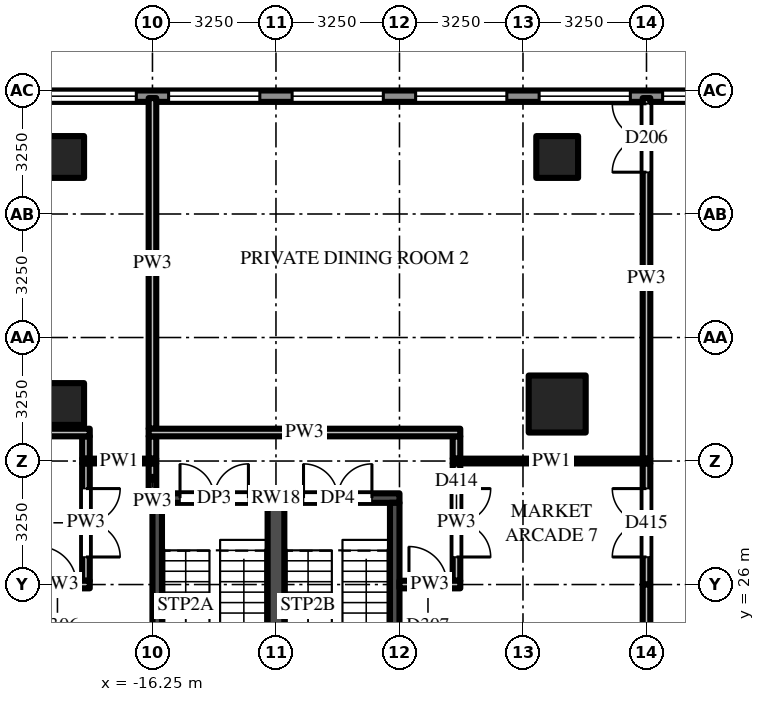
"""IFC4 building model, lengths in metres.
Left out: names, types, materials, properties, quantities, classifications, styles, units other than length and angle.
Written with IfcOpenShell. Run it as: python <this file> out.ifc"""

import sys

from ifc_helpers import new_model, si_unit, direction, frame, frame_2d, origin, origin_2d, place, context, subcontext, project, spatial, rectangle, extrude, source, transform, mapped, element, fill, save


model = new_model("IFC4")
c1 = context("Model", 3, precision=1e-05, world=origin(), true_north=direction((0.0, 1.0)))
c2 = subcontext(c1, "Body", "Model", "MODEL_VIEW")
j1 = project(units=[si_unit("LENGTHUNIT", "METRE"), si_unit("PLANEANGLEUNIT", "RADIAN")], contexts=[c1])
p1 = place(None, origin())
s1 = spatial("IfcSite", under=j1, at=p1, CompositionType="ELEMENT")
p2 = place(p1, origin())
s2 = spatial("IfcBuilding", under=s1, at=p2, CompositionType="ELEMENT")
p3 = place(p2, frame((0.0, 0.0, 19.0)))
s3 = spatial("IfcBuildingStorey", under=s2, at=p3, CompositionType="ELEMENT", Elevation=19.0)
m1 = source(origin(), c2, "Body", "SweptSolid", [
    extrude(rectangle(XDim=1.5, YDim=1.5, at=origin_2d()), origin(), (0.0, 0.0, 1.0), 5.0),
])
p4 = place(p3, frame((-5.6, 30.75, 0.0), z_axis=(0.0, 0.0, 1.0), x_axis=(1.0, 0.0, 0.0)))
e1 = element("IfcColumn", 1, at=p4, inside=s3, PredefinedType="COLUMN", context=c2, shape_type="MappedRepresentation", body=[
    mapped(m1, transform((0.0, 0.0, 0.0))),
])
m2 = source(origin(), c2, "Body", "SweptSolid", [
    extrude(rectangle(XDim=1.1, YDim=1.1, at=origin_2d()), origin(), (0.0, 0.0, 1.0), 5.0),
])
for number, where, z_axis, x_axis in (
    (2, (-5.6, 37.25, 0.0), (0.0, 0.0, 1.0), (1.0, 0.0, 0.0)),
    (3, (-18.6, 30.75, 0.0), (0.0, 0.0, 1.0), (1.0, 0.0, 0.0)),
    (4, (-18.6, 37.25, 0.0), (0.0, 0.0, 1.0), (1.0, 0.0, 0.0)),
):
    element("IfcColumn", number, at=place(p3, frame(where, z_axis=z_axis, x_axis=x_axis)), inside=s3, PredefinedType="COLUMN", context=c2, shape_type="MappedRepresentation", body=[
        mapped(m2, transform((0.0, 0.0, 0.0))),
    ])
m3 = source(origin(), c2, "Body", "SweptSolid", [
    extrude(rectangle(XDim=6.5, YDim=0.25, at=frame_2d((3.25, 0.0))), origin(), (0.0, 0.0, 1.0), 4.7),
])
p5 = place(p3, frame((-16.25, 28.275, 0.0), z_axis=(0.0, 0.0, 1.0), x_axis=(1.0, 0.0, 0.0)))
e5 = element("IfcWall", 5, at=p5, inside=s3, PredefinedType="SHEAR", context=c2, shape_type="MappedRepresentation", body=[
    mapped(m3, transform((0.0, 0.0, 0.0))),
])
m4 = source(origin(), c2, "Body", "SweptSolid", [
    extrude(rectangle(XDim=1.8, YDim=2.1, at=frame_2d((0.9, 1.05))), frame((0.0, 0.135, 0.0), z_axis=(0.0, -1.0, 0.0), x_axis=(1.0, 0.0, 0.0)), (0.0, 0.0, 1.0), 0.27),
])
p6 = place(p5, frame((0.725, 0.0, 0.0)))
e6 = element("IfcOpeningElement", 6, at=p6, cuts=e5, PredefinedType="OPENING", context=c2, shape_type="MappedRepresentation", body=[
    mapped(m4, transform((0.0, 0.0, 0.0))),
])
p7 = place(p5, frame((3.975, 0.0, 0.0)))
e7 = element("IfcOpeningElement", 7, at=p7, cuts=e5, PredefinedType="OPENING", context=c2, shape_type="MappedRepresentation", body=[
    mapped(m4, transform((0.0, 0.0, 0.0))),
])
m5 = source(origin(), c2, "Body", "SweptSolid", [
    extrude(rectangle(XDim=8.3, YDim=0.25, at=frame_2d((4.15, 0.0))), origin(), (0.0, 0.0, 1.0), 4.7),
])
for number, where, z_axis, x_axis in (
    (8, (-16.125, 19.85, 0.0), (0.0, 0.0, 1.0), (0.0, 1.0, 0.0)),
    (9, (-9.875, 19.85, 0.0), (0.0, 0.0, 1.0), (0.0, 1.0, 0.0)),
):
    element("IfcWall", number, at=place(p3, frame(where, z_axis=z_axis, x_axis=x_axis)), inside=s3, PredefinedType="SHEAR", context=c2, shape_type="MappedRepresentation", body=[
        mapped(m5, transform((0.0, 0.0, 0.0))),
    ])
m6 = source(origin(), c2, "Body", "SweptSolid", [
    extrude(rectangle(XDim=8.3, YDim=0.44, at=frame_2d((4.15, 0.0))), origin(), (0.0, 0.0, 1.0), 4.7),
])
p8 = place(p3, frame((-13.0, 19.85, 0.0), z_axis=(0.0, 0.0, 1.0), x_axis=(0.0, 1.0, 0.0)))
e10 = element("IfcWall", 10, at=p8, inside=s3, PredefinedType="SHEAR", context=c2, shape_type="MappedRepresentation", body=[
    mapped(m6, transform((0.0, 0.0, 0.0))),
])
m7 = source(origin(), c2, "Body", "SweptSolid", [
    extrude(rectangle(XDim=71.5, YDim=0.3, at=frame_2d((35.75, 0.0))), origin(), (0.0, 0.0, 1.0), 4.7),
])
p9 = place(p3, frame((35.75, 38.85, 0.0), z_axis=(0.0, 0.0, 1.0), x_axis=(-1.0, 0.0, 0.0)))
e11 = element("IfcWall", 11, at=p9, inside=s3, PredefinedType="SOLIDWALL", context=c2, shape_type="MappedRepresentation", body=[
    mapped(m7, transform((0.0, 0.0, 0.0))),
])
m8 = source(origin(), c2, "Body", "SweptSolid", [
    extrude(rectangle(XDim=2.4, YDim=3.0, at=frame_2d((1.2, 1.5))), frame((0.0, 0.16, 0.0), z_axis=(0.0, -1.0, 0.0), x_axis=(1.0, 0.0, 0.0)), (0.0, 0.0, 1.0), 0.32),
])
p10 = place(p9, frame((0.425, 0.0, 0.9)))
e12 = element("IfcOpeningElement", 12, at=p10, cuts=e11, PredefinedType="OPENING", context=c2, shape_type="MappedRepresentation", body=[
    mapped(m8, transform((0.0, 0.0, 0.0))),
])
p11 = place(p9, frame((3.675, 0.0, 0.9)))
e13 = element("IfcOpeningElement", 13, at=p11, cuts=e11, PredefinedType="OPENING", context=c2, shape_type="MappedRepresentation", body=[
    mapped(m8, transform((0.0, 0.0, 0.0))),
])
p12 = place(p9, frame((6.925, 0.0, 0.9)))
e14 = element("IfcOpeningElement", 14, at=p12, cuts=e11, PredefinedType="OPENING", context=c2, shape_type="MappedRepresentation", body=[
    mapped(m8, transform((0.0, 0.0, 0.0))),
])
p13 = place(p9, frame((10.175, 0.0, 0.9)))
e15 = element("IfcOpeningElement", 15, at=p13, cuts=e11, PredefinedType="OPENING", context=c2, shape_type="MappedRepresentation", body=[
    mapped(m8, transform((0.0, 0.0, 0.0))),
])
p14 = place(p9, frame((13.425, 0.0, 0.9)))
e16 = element("IfcOpeningElement", 16, at=p14, cuts=e11, PredefinedType="OPENING", context=c2, shape_type="MappedRepresentation", body=[
    mapped(m8, transform((0.0, 0.0, 0.0))),
])
p15 = place(p9, frame((16.675, 0.0, 0.9)))
e17 = element("IfcOpeningElement", 17, at=p15, cuts=e11, PredefinedType="OPENING", context=c2, shape_type="MappedRepresentation", body=[
    mapped(m8, transform((0.0, 0.0, 0.0))),
])
p16 = place(p9, frame((19.925, 0.0, 0.9)))
e18 = element("IfcOpeningElement", 18, at=p16, cuts=e11, PredefinedType="OPENING", context=c2, shape_type="MappedRepresentation", body=[
    mapped(m8, transform((0.0, 0.0, 0.0))),
])
p17 = place(p9, frame((23.175, 0.0, 0.9)))
e19 = element("IfcOpeningElement", 19, at=p17, cuts=e11, PredefinedType="OPENING", context=c2, shape_type="MappedRepresentation", body=[
    mapped(m8, transform((0.0, 0.0, 0.0))),
])
p18 = place(p9, frame((26.425, 0.0, 0.9)))
e20 = element("IfcOpeningElement", 20, at=p18, cuts=e11, PredefinedType="OPENING", context=c2, shape_type="MappedRepresentation", body=[
    mapped(m8, transform((0.0, 0.0, 0.0))),
])
p19 = place(p9, frame((29.675, 0.0, 0.9)))
e21 = element("IfcOpeningElement", 21, at=p19, cuts=e11, PredefinedType="OPENING", context=c2, shape_type="MappedRepresentation", body=[
    mapped(m8, transform((0.0, 0.0, 0.0))),
])
p20 = place(p9, frame((32.925, 0.0, 0.9)))
e22 = element("IfcOpeningElement", 22, at=p20, cuts=e11, PredefinedType="OPENING", context=c2, shape_type="MappedRepresentation", body=[
    mapped(m8, transform((0.0, 0.0, 0.0))),
])
p21 = place(p9, frame((36.175, 0.0, 0.9)))
e23 = element("IfcOpeningElement", 23, at=p21, cuts=e11, PredefinedType="OPENING", context=c2, shape_type="MappedRepresentation", body=[
    mapped(m8, transform((0.0, 0.0, 0.0))),
])
p22 = place(p9, frame((39.425, 0.0, 0.9)))
e24 = element("IfcOpeningElement", 24, at=p22, cuts=e11, PredefinedType="OPENING", context=c2, shape_type="MappedRepresentation", body=[
    mapped(m8, transform((0.0, 0.0, 0.0))),
])
p23 = place(p9, frame((42.675, 0.0, 0.9)))
e25 = element("IfcOpeningElement", 25, at=p23, cuts=e11, PredefinedType="OPENING", context=c2, shape_type="MappedRepresentation", body=[
    mapped(m8, transform((0.0, 0.0, 0.0))),
])
p24 = place(p9, frame((45.925, 0.0, 0.9)))
e26 = element("IfcOpeningElement", 26, at=p24, cuts=e11, PredefinedType="OPENING", context=c2, shape_type="MappedRepresentation", body=[
    mapped(m8, transform((0.0, 0.0, 0.0))),
])
p25 = place(p9, frame((49.175, 0.0, 0.9)))
e27 = element("IfcOpeningElement", 27, at=p25, cuts=e11, PredefinedType="OPENING", context=c2, shape_type="MappedRepresentation", body=[
    mapped(m8, transform((0.0, 0.0, 0.0))),
])
p26 = place(p9, frame((52.425, 0.0, 0.9)))
e28 = element("IfcOpeningElement", 28, at=p26, cuts=e11, PredefinedType="OPENING", context=c2, shape_type="MappedRepresentation", body=[
    mapped(m8, transform((0.0, 0.0, 0.0))),
])
p27 = place(p9, frame((55.675, 0.0, 0.9)))
e29 = element("IfcOpeningElement", 29, at=p27, cuts=e11, PredefinedType="OPENING", context=c2, shape_type="MappedRepresentation", body=[
    mapped(m8, transform((0.0, 0.0, 0.0))),
])
p28 = place(p9, frame((58.925, 0.0, 0.9)))
e30 = element("IfcOpeningElement", 30, at=p28, cuts=e11, PredefinedType="OPENING", context=c2, shape_type="MappedRepresentation", body=[
    mapped(m8, transform((0.0, 0.0, 0.0))),
])
p29 = place(p9, frame((62.175, 0.0, 0.9)))
e31 = element("IfcOpeningElement", 31, at=p29, cuts=e11, PredefinedType="OPENING", context=c2, shape_type="MappedRepresentation", body=[
    mapped(m8, transform((0.0, 0.0, 0.0))),
])
p30 = place(p9, frame((65.425, 0.0, 0.9)))
e32 = element("IfcOpeningElement", 32, at=p30, cuts=e11, PredefinedType="OPENING", context=c2, shape_type="MappedRepresentation", body=[
    mapped(m8, transform((0.0, 0.0, 0.0))),
])
p31 = place(p9, frame((68.675, 0.0, 0.9)))
e33 = element("IfcOpeningElement", 33, at=p31, cuts=e11, PredefinedType="OPENING", context=c2, shape_type="MappedRepresentation", body=[
    mapped(m8, transform((0.0, 0.0, 0.0))),
])
m9 = source(origin(), c2, "Body", "SweptSolid", [
    extrude(rectangle(XDim=3.087, YDim=0.2, at=frame_2d((1.544, 0.0))), origin(), (0.0, 0.0, 1.0), 4.274),
])
p32 = place(p3, frame((-18.0, 29.188, 0.0), z_axis=(0.0, 0.0, 1.0), x_axis=(0.0, -1.0, 0.0)))
e34 = element("IfcWall", 34, at=p32, inside=s3, PredefinedType="PARTITIONING", context=c2, shape_type="MappedRepresentation", body=[
    mapped(m9, transform((0.0, 0.0, 0.0))),
])
m10 = source(origin(), c2, "Body", "SweptSolid", [
    extrude(rectangle(XDim=1.8, YDim=2.1, at=frame_2d((0.9, 1.05))), frame((0.0, 0.11, 0.0), z_axis=(0.0, -1.0, 0.0), x_axis=(1.0, 0.0, 0.0)), (0.0, 0.0, 1.0), 0.22),
])
p33 = place(p32, frame((0.663, 0.0, 0.0)))
e35 = element("IfcOpeningElement", 35, at=p33, cuts=e34, PredefinedType="OPENING", context=c2, shape_type="MappedRepresentation", body=[
    mapped(m10, transform((0.0, 0.0, 0.0))),
])
m11 = source(origin(), c2, "Body", "SweptSolid", [
    extrude(rectangle(XDim=0.587, YDim=0.2, at=frame_2d((0.294, 0.0))), origin(), (0.0, 0.0, 1.0), 4.7),
])
p34 = place(p3, frame((-18.0, 29.312, 0.0), z_axis=(0.0, 0.0, 1.0), x_axis=(0.0, 1.0, 0.0)))
e36 = element("IfcWall", 36, at=p34, inside=s3, PredefinedType="PARTITIONING", context=c2, shape_type="MappedRepresentation", body=[
    mapped(m11, transform((0.0, 0.0, 0.0))),
])
m12 = source(origin(), c2, "Body", "SweptSolid", [
    extrude(rectangle(XDim=0.788, YDim=0.2, at=frame_2d((0.394, 0.0))), origin(), (0.0, 0.0, 1.0), 4.7),
])
p35 = place(p3, frame((-16.25, 28.4, 0.0), z_axis=(0.0, 0.0, 1.0), x_axis=(0.0, 1.0, 0.0)))
e37 = element("IfcWall", 37, at=p35, inside=s3, PredefinedType="PARTITIONING", context=c2, shape_type="MappedRepresentation", body=[
    mapped(m12, transform((0.0, 0.0, 0.0))),
])
m13 = source(origin(), c2, "Body", "SweptSolid", [
    extrude(rectangle(XDim=8.7, YDim=0.2, at=frame_2d((4.35, 0.0))), origin(), (0.0, 0.0, 1.0), 3.762),
])
p36 = place(p3, frame((-16.25, 30.1, 0.0), z_axis=(0.0, 0.0, 1.0), x_axis=(0.0, 1.0, 0.0)))
e38 = element("IfcWall", 38, at=p36, inside=s3, PredefinedType="PARTITIONING", context=c2, shape_type="MappedRepresentation", body=[
    mapped(m13, transform((0.0, 0.0, 0.0))),
])
p37 = place(p3, frame((-16.25, 29.312, 0.0), z_axis=(0.0, 0.0, 1.0), x_axis=(0.0, 1.0, 0.0)))
e39 = element("IfcWall", 39, at=p37, inside=s3, PredefinedType="PARTITIONING", context=c2, shape_type="MappedRepresentation", body=[
    mapped(m11, transform((0.0, 0.0, 0.0))),
])
p38 = place(p3, frame((-8.25, 29.188, 0.0), z_axis=(0.0, 0.0, 1.0), x_axis=(0.0, -1.0, 0.0)))
e40 = element("IfcWall", 40, at=p38, inside=s3, PredefinedType="PARTITIONING", context=c2, shape_type="MappedRepresentation", body=[
    mapped(m9, transform((0.0, 0.0, 0.0))),
])
p39 = place(p38, frame((0.663, 0.0, 0.0)))
e41 = element("IfcOpeningElement", 41, at=p39, cuts=e40, PredefinedType="OPENING", context=c2, shape_type="MappedRepresentation", body=[
    mapped(m10, transform((0.0, 0.0, 0.0))),
])
p40 = place(p3, frame((-8.25, 29.312, 0.0), z_axis=(0.0, 0.0, 1.0), x_axis=(0.0, 1.0, 0.0)))
e42 = element("IfcWall", 42, at=p40, inside=s3, PredefinedType="PARTITIONING", context=c2, shape_type="MappedRepresentation", body=[
    mapped(m11, transform((0.0, 0.0, 0.0))),
])
m14 = source(origin(), c2, "Body", "SweptSolid", [
    extrude(rectangle(XDim=3.188, YDim=0.2, at=frame_2d((1.594, 0.0))), origin(), (0.0, 0.0, 1.0), 4.7),
])
p41 = place(p3, frame((-3.25, 26.0, 0.0), z_axis=(0.0, 0.0, 1.0), x_axis=(0.0, 1.0, 0.0)))
e43 = element("IfcWall", 43, at=p41, inside=s3, PredefinedType="PARTITIONING", context=c2, shape_type="MappedRepresentation", body=[
    mapped(m14, transform((0.0, 0.0, 0.0))),
])
p42 = place(p41, frame((0.725, 0.0, 0.0)))
e44 = element("IfcOpeningElement", 44, at=p42, cuts=e43, PredefinedType="OPENING", context=c2, shape_type="MappedRepresentation", body=[
    mapped(m10, transform((0.0, 0.0, 0.0))),
])
m15 = source(origin(), c2, "Body", "SweptSolid", [
    extrude(rectangle(XDim=6.4, YDim=0.2, at=frame_2d((3.2, 0.0))), origin(), (0.0, 0.0, 1.0), 4.7),
])
p43 = place(p3, frame((-3.25, 26.0, 0.0), z_axis=(0.0, 0.0, 1.0), x_axis=(0.0, -1.0, 0.0)))
e45 = element("IfcWall", 45, at=p43, inside=s3, PredefinedType="PARTITIONING", context=c2, shape_type="MappedRepresentation", body=[
    mapped(m15, transform((0.0, 0.0, 0.0))),
])
m16 = source(origin(), c2, "Body", "SweptSolid", [
    extrude(rectangle(XDim=9.488, YDim=0.2, at=frame_2d((4.744, 0.0))), origin(), (0.0, 0.0, 1.0), 3.918),
])
p44 = place(p3, frame((-3.25, 29.312, 0.0), z_axis=(0.0, 0.0, 1.0), x_axis=(0.0, 1.0, 0.0)))
e46 = element("IfcWall", 46, at=p44, inside=s3, PredefinedType="PARTITIONING", context=c2, shape_type="MappedRepresentation", body=[
    mapped(m16, transform((0.0, 0.0, 0.0))),
])
p45 = place(p44, frame((7.538, 0.0, 0.0)))
e47 = element("IfcOpeningElement", 47, at=p45, cuts=e46, PredefinedType="OPENING", context=c2, shape_type="MappedRepresentation", body=[
    mapped(m10, transform((0.0, 0.0, 0.0))),
])
m17 = source(origin(), c2, "Body", "SweptSolid", [
    extrude(rectangle(XDim=1.6, YDim=0.2, at=frame_2d((0.8, 0.0))), origin(), (0.0, 0.0, 1.0), 3.762),
])
p46 = place(p3, frame((-19.5, 26.0, 0.0), z_axis=(0.0, 0.0, 1.0), x_axis=(1.0, 0.0, 0.0)))
e48 = element("IfcWall", 48, at=p46, inside=s3, PredefinedType="PARTITIONING", context=c2, shape_type="MappedRepresentation", body=[
    mapped(m17, transform((0.0, 0.0, 0.0))),
])
m18 = source(origin(), c2, "Body", "SweptSolid", [
    extrude(rectangle(XDim=1.0, YDim=2.1, at=frame_2d((0.5, 1.05))), frame((0.0, 0.11, 0.0), z_axis=(0.0, -1.0, 0.0), x_axis=(1.0, 0.0, 0.0)), (0.0, 0.0, 1.0), 0.22),
])
p47 = place(p46, frame((0.25, 0.0, 0.0)))
e49 = element("IfcOpeningElement", 49, at=p47, cuts=e48, PredefinedType="OPENING", context=c2, shape_type="MappedRepresentation", body=[
    mapped(m18, transform((0.0, 0.0, 0.0))),
])
m19 = source(origin(), c2, "Body", "SweptSolid", [
    extrude(rectangle(XDim=1.6, YDim=0.2, at=frame_2d((0.8, 0.0))), origin(), (0.0, 0.0, 1.0), 4.7),
])
p48 = place(p3, frame((-9.75, 26.0, 0.0), z_axis=(0.0, 0.0, 1.0), x_axis=(1.0, 0.0, 0.0)))
e50 = element("IfcWall", 50, at=p48, inside=s3, PredefinedType="PARTITIONING", context=c2, shape_type="MappedRepresentation", body=[
    mapped(m19, transform((0.0, 0.0, 0.0))),
])
p49 = place(p48, frame((0.25, 0.0, 0.0)))
e51 = element("IfcOpeningElement", 51, at=p49, cuts=e50, PredefinedType="OPENING", context=c2, shape_type="MappedRepresentation", body=[
    mapped(m18, transform((0.0, 0.0, 0.0))),
])
m20 = source(origin(), c2, "Body", "SweptSolid", [
    extrude(rectangle(XDim=1.95, YDim=0.125, at=frame_2d((0.975, 0.0))), origin(), (0.0, 0.0, 1.0), 4.7),
])
p50 = place(p3, frame((-18.1, 29.25, 0.0), z_axis=(0.0, 0.0, 1.0), x_axis=(1.0, 0.0, 0.0)))
e52 = element("IfcWall", 52, at=p50, inside=s3, PredefinedType="PARTITIONING", context=c2, shape_type="MappedRepresentation", body=[
    mapped(m20, transform((0.0, 0.0, 0.0))),
])
m21 = source(origin(), c2, "Body", "SweptSolid", [
    extrude(rectangle(XDim=5.2, YDim=0.125, at=frame_2d((2.6, 0.0))), origin(), (0.0, 0.0, 1.0), 3.762),
])
p51 = place(p3, frame((-8.35, 29.25, 0.0), z_axis=(0.0, 0.0, 1.0), x_axis=(1.0, 0.0, 0.0)))
e53 = element("IfcWall", 53, at=p51, inside=s3, PredefinedType="PARTITIONING", context=c2, shape_type="MappedRepresentation", body=[
    mapped(m21, transform((0.0, 0.0, 0.0))),
])
m22 = source(origin(), c2, "Body", "SweptSolid", [
    extrude(rectangle(XDim=8.2, YDim=0.2, at=frame_2d((4.1, 0.0))), origin(), (0.0, 0.0, 1.0), 3.762),
])
p52 = place(p3, frame((-26.1, 30.0, 0.0), z_axis=(0.0, 0.0, 1.0), x_axis=(1.0, 0.0, 0.0)))
e54 = element("IfcWall", 54, at=p52, inside=s3, PredefinedType="PARTITIONING", context=c2, shape_type="MappedRepresentation", body=[
    mapped(m22, transform((0.0, 0.0, 0.0))),
])
m23 = source(origin(), c2, "Body", "SweptSolid", [
    extrude(rectangle(XDim=8.2, YDim=0.2, at=frame_2d((4.1, 0.0))), origin(), (0.0, 0.0, 1.0), 4.7),
])
p53 = place(p3, frame((-16.35, 30.0, 0.0), z_axis=(0.0, 0.0, 1.0), x_axis=(1.0, 0.0, 0.0)))
e55 = element("IfcWall", 55, at=p53, inside=s3, PredefinedType="PARTITIONING", context=c2, shape_type="MappedRepresentation", body=[
    mapped(m23, transform((0.0, 0.0, 0.0))),
])
m24 = source(origin(), c2, "Body", "SweptSolid", [
    extrude(rectangle(XDim=1.8, YDim=2.1, at=frame_2d((0.9, 1.05))), frame((0.0, 0.025, 0.0), z_axis=(0.0, -1.0, 0.0), x_axis=(1.0, 0.0, 0.0)), (0.0, 0.0, 1.0), 0.05),
])
p54 = place(p6, origin())
e56 = element("IfcDoor", 56, at=p54, inside=s3, OperationType="DOUBLE_DOOR_SINGLE_SWING", PredefinedType="DOOR", context=c2, shape_type="MappedRepresentation", body=[
    mapped(m24, transform((0.0, 0.0, 0.0))),
])
fill(e6, e56)
p55 = place(p7, origin())
e57 = element("IfcDoor", 57, at=p55, inside=s3, OperationType="DOUBLE_DOOR_SINGLE_SWING", PredefinedType="DOOR", context=c2, shape_type="MappedRepresentation", body=[
    mapped(m24, transform((0.0, 0.0, 0.0))),
])
fill(e7, e57)
m25 = source(origin(), c2, "Body", "SweptSolid", [
    extrude(rectangle(XDim=2.4, YDim=3.0, at=frame_2d((1.2, 1.5))), frame((0.0, 0.03, 0.0), z_axis=(0.0, -1.0, 0.0), x_axis=(1.0, 0.0, 0.0)), (0.0, 0.0, 1.0), 0.06),
])
p56 = place(p21, origin())
e58 = element("IfcWindow", 58, at=p56, inside=s3, PartitioningType="SINGLE_PANEL", PredefinedType="WINDOW", context=c2, shape_type="MappedRepresentation", body=[
    mapped(m25, transform((0.0, 0.0, 0.0))),
])
fill(e23, e58)
p57 = place(p22, origin())
e59 = element("IfcWindow", 59, at=p57, inside=s3, PartitioningType="SINGLE_PANEL", PredefinedType="WINDOW", context=c2, shape_type="MappedRepresentation", body=[
    mapped(m25, transform((0.0, 0.0, 0.0))),
])
fill(e24, e59)
p58 = place(p23, origin())
e60 = element("IfcWindow", 60, at=p58, inside=s3, PartitioningType="SINGLE_PANEL", PredefinedType="WINDOW", context=c2, shape_type="MappedRepresentation", body=[
    mapped(m25, transform((0.0, 0.0, 0.0))),
])
fill(e25, e60)
p59 = place(p24, origin())
e61 = element("IfcWindow", 61, at=p59, inside=s3, PartitioningType="SINGLE_PANEL", PredefinedType="WINDOW", context=c2, shape_type="MappedRepresentation", body=[
    mapped(m25, transform((0.0, 0.0, 0.0))),
])
fill(e26, e61)
p60 = place(p25, origin())
e62 = element("IfcWindow", 62, at=p60, inside=s3, PartitioningType="SINGLE_PANEL", PredefinedType="WINDOW", context=c2, shape_type="MappedRepresentation", body=[
    mapped(m25, transform((0.0, 0.0, 0.0))),
])
fill(e27, e62)
p61 = place(p26, origin())
e63 = element("IfcWindow", 63, at=p61, inside=s3, PartitioningType="SINGLE_PANEL", PredefinedType="WINDOW", context=c2, shape_type="MappedRepresentation", body=[
    mapped(m25, transform((0.0, 0.0, 0.0))),
])
fill(e28, e63)
m26 = source(origin(), c2, "Body", "SweptSolid", [
    extrude(rectangle(XDim=1.0, YDim=2.1, at=frame_2d((0.5, 1.05))), frame((0.0, 0.025, 0.0), z_axis=(0.0, -1.0, 0.0), x_axis=(1.0, 0.0, 0.0)), (0.0, 0.0, 1.0), 0.05),
])
p62 = place(p47, origin())
e64 = element("IfcDoor", 64, at=p62, inside=s3, OperationType="SINGLE_SWING_LEFT", PredefinedType="DOOR", context=c2, shape_type="MappedRepresentation", body=[
    mapped(m26, transform((0.0, 0.0, 0.0))),
])
fill(e49, e64)
p63 = place(p49, origin())
e65 = element("IfcDoor", 65, at=p63, inside=s3, OperationType="SINGLE_SWING_LEFT", PredefinedType="DOOR", context=c2, shape_type="MappedRepresentation", body=[
    mapped(m26, transform((0.0, 0.0, 0.0))),
])
fill(e51, e65)
p64 = place(p33, origin())
e66 = element("IfcDoor", 66, at=p64, inside=s3, OperationType="DOUBLE_DOOR_SINGLE_SWING", PredefinedType="DOOR", context=c2, shape_type="MappedRepresentation", body=[
    mapped(m24, transform((0.0, 0.0, 0.0))),
])
fill(e35, e66)
p65 = place(p39, origin())
e67 = element("IfcDoor", 67, at=p65, inside=s3, OperationType="DOUBLE_DOOR_SINGLE_SWING", PredefinedType="DOOR", context=c2, shape_type="MappedRepresentation", body=[
    mapped(m24, transform((0.0, 0.0, 0.0))),
])
fill(e41, e67)
p66 = place(p42, origin())
e68 = element("IfcDoor", 68, at=p66, inside=s3, OperationType="DOUBLE_DOOR_SINGLE_SWING", PredefinedType="DOOR", context=c2, shape_type="MappedRepresentation", body=[
    mapped(m24, transform((0.0, 0.0, 0.0))),
])
fill(e44, e68)
p67 = place(p45, origin())
e69 = element("IfcDoor", 69, at=p67, inside=s3, OperationType="DOUBLE_DOOR_SINGLE_SWING", PredefinedType="DOOR", context=c2, shape_type="MappedRepresentation", body=[
    mapped(m24, transform((0.0, 0.0, 0.0))),
])
fill(e47, e69)
save(model, sys.argv[1])
